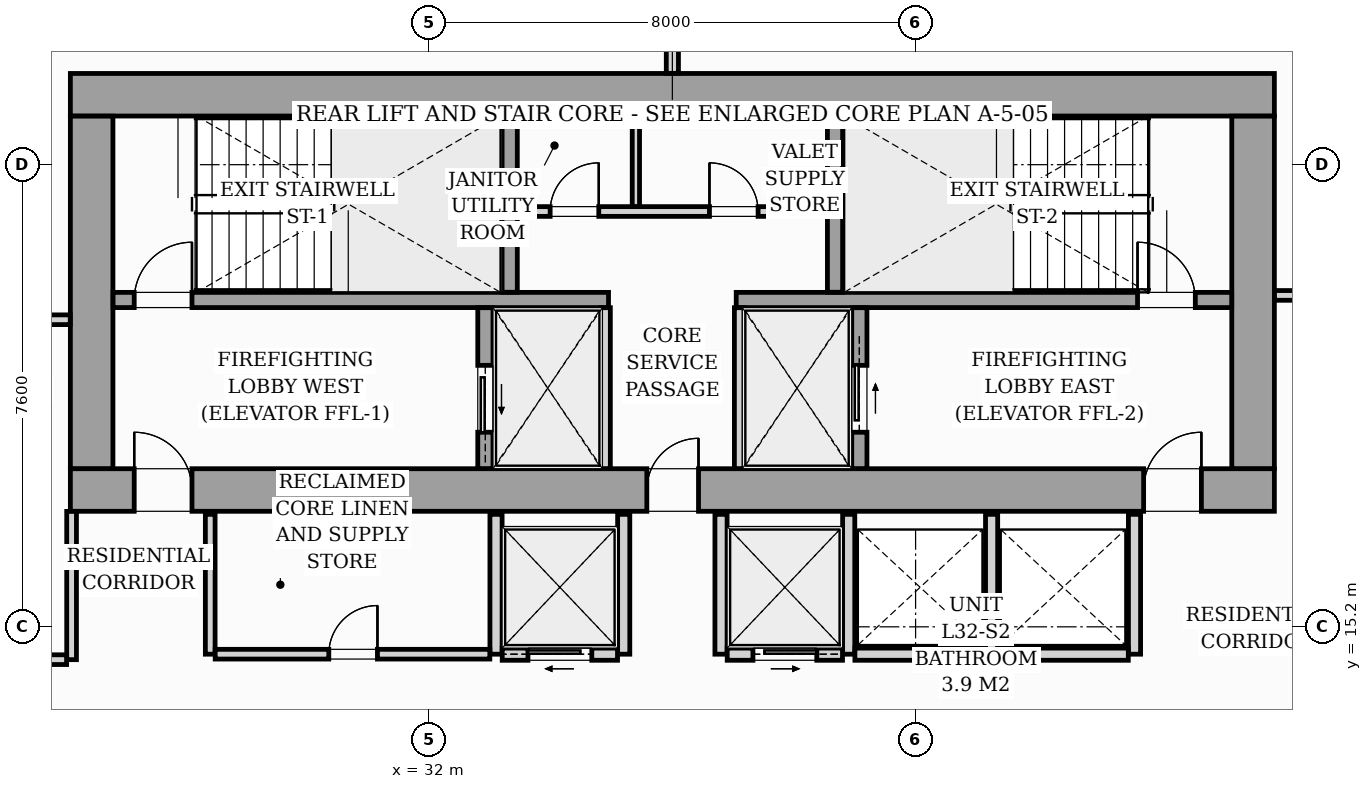
"""IFC4 building model, lengths in metres.
Left out: names, types, materials, properties, quantities, classifications, styles, units other than length and angle.
Written with IfcOpenShell. Run it as: python <this file> out.ifc"""

import sys

from ifc_helpers import new_model, si_unit, direction, frame, frame_2d, origin, origin_2d, place, context, subcontext, project, spatial, rectangle, i_section, extrude, source, transform, mapped, element, fill, save


model = new_model("IFC4")
c1 = context("Model", 3, precision=1e-05, world=origin(), true_north=direction((0.0, 1.0)))
c2 = subcontext(c1, "Body", "Model", "MODEL_VIEW")
j1 = project(units=[si_unit("LENGTHUNIT", "METRE"), si_unit("PLANEANGLEUNIT", "RADIAN")], contexts=[c1])
p1 = place(None, origin())
s1 = spatial("IfcSite", under=j1, at=p1, CompositionType="ELEMENT")
p2 = place(p1, origin())
s2 = spatial("IfcBuilding", under=s1, at=p2, CompositionType="ELEMENT")
p3 = place(p2, frame((0.0, 0.0, 113.0)))
s3 = spatial("IfcBuildingStorey", under=s2, at=p3, CompositionType="ELEMENT", Elevation=113.0)
m1 = source(origin(), c2, "Body", "SweptSolid", [
    extrude(i_section(OverallWidth=0.427, OverallDepth=0.483, WebThickness=0.051, FlangeThickness=0.082, FilletRadius=0.018, at=origin_2d()), origin(), (0.0, 0.0, 1.0), 3.196),
])
for number, where, z_axis, x_axis in (
    (1, (26.4, 17.4, 0.002), (0.0, 0.0, 1.0), (1.0, 0.0, 0.0)),
    (2, (33.12, 17.4, 0.002), (0.0, 0.0, 1.0), (1.0, 0.0, 0.0)),
    (3, (38.88, 17.4, 0.002), (0.0, 0.0, 1.0), (1.0, 0.0, 0.0)),
    (4, (45.6, 17.4, 0.002), (0.0, 0.0, 1.0), (1.0, 0.0, 0.0)),
    (5, (26.4, 24.0, 0.002), (0.0, 0.0, 1.0), (1.0, 0.0, 0.0)),
    (6, (33.12, 24.0, 0.002), (0.0, 0.0, 1.0), (1.0, 0.0, 0.0)),
    (7, (38.88, 24.0, 0.002), (0.0, 0.0, 1.0), (1.0, 0.0, 0.0)),
    (8, (45.6, 24.0, 0.002), (0.0, 0.0, 1.0), (1.0, 0.0, 0.0)),
):
    element("IfcColumn", number, at=place(p3, frame(where, z_axis=z_axis, x_axis=x_axis)), inside=s3, PredefinedType="PILASTER", context=c2, shape_type="MappedRepresentation", body=[
        mapped(m1, transform((0.0, 0.0, 0.0), scale=1.0)),
    ])
p4 = place(p3, frame((11.08, 23.508, 0.0), z_axis=(0.0, 0.0, 1.0), x_axis=(0.995396638587, 0.095841180552, 0.0)))
e9 = element("IfcWall", 9, at=p4, inside=s3, PredefinedType="STANDARD", context=c2, shape_type="SweptSolid", body=[
    extrude(rectangle(XDim=19.11, YDim=0.26, at=frame_2d((9.555, 0.0))), origin(), (0.0, 0.0, 1.0), 2.94),
])
p5 = place(p4, frame((10.823, 0.0, 0.0)))
e10 = element("IfcOpeningElement", 10, at=p5, cuts=e9, PredefinedType="OPENING", context=c2, shape_type="SweptSolid", body=[
    extrude(rectangle(XDim=1.8, YDim=2.06, at=frame_2d((0.9, 1.03))), frame((0.0, 0.14, 0.0), z_axis=(0.0, -1.0, 0.0), x_axis=(1.0, 0.0, 0.0)), (0.0, 0.0, 1.0), 0.28),
])
p6 = place(p4, frame((2.05, 0.0, 0.65)))
e11 = element("IfcOpeningElement", 11, at=p6, cuts=e9, PredefinedType="OPENING", context=c2, shape_type="SweptSolid", body=[
    extrude(rectangle(XDim=1.6, YDim=1.5, at=frame_2d((0.8, 0.75))), frame((0.0, 0.14, 0.0), z_axis=(0.0, -1.0, 0.0), x_axis=(1.0, 0.0, 0.0)), (0.0, 0.0, 1.0), 0.28),
])
p7 = place(p3, frame((26.1, 17.45, 0.0), z_axis=(0.0, 0.0, 1.0), x_axis=(1.0, 0.0, 0.0)))
e12 = element("IfcWall", 12, at=p7, inside=s3, PredefinedType="SHEAR", context=c2, shape_type="SweptSolid", body=[
    extrude(rectangle(XDim=19.8, YDim=0.7, at=frame_2d((9.9, 0.0))), origin(), (0.0, 0.0, 1.0), 3.2),
])
p8 = place(p7, frame((1.05, 0.0, 0.0)))
e13 = element("IfcOpeningElement", 13, at=p8, cuts=e12, PredefinedType="OPENING", context=c2, shape_type="SweptSolid", body=[
    extrude(rectangle(XDim=0.95, YDim=2.06, at=frame_2d((0.475, 1.03))), frame((0.0, 0.36, 0.0), z_axis=(0.0, -1.0, 0.0), x_axis=(1.0, 0.0, 0.0)), (0.0, 0.0, 1.0), 0.72),
])
p9 = place(p7, frame((9.48, 0.0, 0.0)))
e14 = element("IfcOpeningElement", 14, at=p9, cuts=e12, PredefinedType="OPENING", context=c2, shape_type="SweptSolid", body=[
    extrude(rectangle(XDim=0.85, YDim=2.0, at=frame_2d((0.425, 1.0))), frame((0.0, 0.36, 0.0), z_axis=(0.0, -1.0, 0.0), x_axis=(1.0, 0.0, 0.0)), (0.0, 0.0, 1.0), 0.72),
])
p10 = place(p7, frame((17.65, 0.0, 0.0)))
e15 = element("IfcOpeningElement", 15, at=p10, cuts=e12, PredefinedType="OPENING", context=c2, shape_type="SweptSolid", body=[
    extrude(rectangle(XDim=0.95, YDim=2.06, at=frame_2d((0.475, 1.03))), frame((0.0, 0.36, 0.0), z_axis=(0.0, -1.0, 0.0), x_axis=(1.0, 0.0, 0.0)), (0.0, 0.0, 1.0), 0.72),
])
p11 = place(p3, frame((26.1, 23.95, 0.0), z_axis=(0.0, 0.0, 1.0), x_axis=(1.0, 0.0, 0.0)))
e16 = element("IfcWall", 16, at=p11, inside=s3, PredefinedType="SHEAR", context=c2, shape_type="SweptSolid", body=[
    extrude(rectangle(XDim=19.8, YDim=0.7, at=frame_2d((9.9, 0.0))), origin(), (0.0, 0.0, 1.0), 3.2),
])
for number, where, z_axis, x_axis in (
    (17, (26.45, 17.802, 0.0), (0.0, 0.0, 1.0), (0.0, 1.0, 0.0)),
    (18, (45.55, 17.802, 0.0), (0.0, 0.0, 1.0), (0.0, 1.0, 0.0)),
):
    element("IfcWall", number, at=place(p3, frame(where, z_axis=z_axis, x_axis=x_axis)), inside=s3, PredefinedType="SHEAR", context=c2, shape_type="SweptSolid", body=[
        extrude(rectangle(XDim=5.796, YDim=0.7, at=frame_2d((2.898, 0.0))), origin(), (0.0, 0.0, 1.0), 3.2),
    ])
p12 = place(p3, frame((26.802, 20.575, 0.0), z_axis=(0.0, 0.0, 1.0), x_axis=(1.0, 0.0, 0.0)))
e19 = element("IfcWall", 19, at=p12, inside=s3, PredefinedType="SOLIDWALL", context=c2, shape_type="SweptSolid", body=[
    extrude(rectangle(XDim=8.148, YDim=0.25, at=frame_2d((4.074, 0.0))), origin(), (0.0, 0.0, 1.0), 3.2),
])
p13 = place(p12, frame((0.348, 0.0, 0.0)))
e20 = element("IfcOpeningElement", 20, at=p13, cuts=e19, PredefinedType="OPENING", context=c2, shape_type="SweptSolid", body=[
    extrude(rectangle(XDim=0.95, YDim=2.06, at=frame_2d((0.475, 1.03))), frame((0.0, 0.135, 0.0), z_axis=(0.0, -1.0, 0.0), x_axis=(1.0, 0.0, 0.0)), (0.0, 0.0, 1.0), 0.27),
])
p14 = place(p3, frame((37.05, 20.575, 0.0), z_axis=(0.0, 0.0, 1.0), x_axis=(1.0, 0.0, 0.0)))
e21 = element("IfcWall", 21, at=p14, inside=s3, PredefinedType="SOLIDWALL", context=c2, shape_type="SweptSolid", body=[
    extrude(rectangle(XDim=8.148, YDim=0.25, at=frame_2d((4.074, 0.0))), origin(), (0.0, 0.0, 1.0), 3.2),
])
p15 = place(p14, frame((6.6, 0.0, 0.0)))
e22 = element("IfcOpeningElement", 22, at=p15, cuts=e21, PredefinedType="OPENING", context=c2, shape_type="SweptSolid", body=[
    extrude(rectangle(XDim=0.95, YDim=2.06, at=frame_2d((0.475, 1.03))), frame((0.0, 0.135, 0.0), z_axis=(0.0, -1.0, 0.0), x_axis=(1.0, 0.0, 0.0)), (0.0, 0.0, 1.0), 0.27),
])
for number, where, z_axis, x_axis in (
    (23, (33.325, 20.702, 0.0), (0.0, 0.0, 1.0), (0.0, 1.0, 0.0)),
    (24, (38.675, 20.702, 0.0), (0.0, 0.0, 1.0), (0.0, 1.0, 0.0)),
):
    element("IfcWall", number, at=place(p3, frame(where, z_axis=z_axis, x_axis=x_axis)), inside=s3, PredefinedType="SOLIDWALL", context=c2, shape_type="SweptSolid", body=[
        extrude(rectangle(XDim=2.896, YDim=0.25, at=frame_2d((1.448, 0.0))), origin(), (0.0, 0.0, 1.0), 3.2),
    ])
p16 = place(p3, frame((32.925, 17.802, 0.0), z_axis=(0.0, 0.0, 1.0), x_axis=(0.0, 1.0, 0.0)))
e25 = element("IfcWall", 25, at=p16, inside=s3, PredefinedType="SOLIDWALL", context=c2, shape_type="SweptSolid", body=[
    extrude(rectangle(XDim=2.646, YDim=0.25, at=frame_2d((1.323, 0.0))), origin(), (0.0, 0.0, 1.0), 3.2),
])
p17 = place(p16, frame((0.598, 0.0, 0.0)))
e26 = element("IfcOpeningElement", 26, at=p17, cuts=e25, PredefinedType="OPENING", context=c2, shape_type="SweptSolid", body=[
    extrude(rectangle(XDim=1.1, YDim=2.08, at=frame_2d((0.55, 1.04))), frame((0.0, 0.135, 0.0), z_axis=(0.0, -1.0, 0.0), x_axis=(1.0, 0.0, 0.0)), (0.0, 0.0, 1.0), 0.27),
])
for number, where, z_axis, x_axis in (
    (27, (34.9, 17.802, 0.0), (0.0, 0.0, 1.0), (0.0, 1.0, 0.0)),
    (28, (37.1, 17.802, 0.0), (0.0, 0.0, 1.0), (0.0, 1.0, 0.0)),
):
    element("IfcWall", number, at=place(p3, frame(where, z_axis=z_axis, x_axis=x_axis)), inside=s3, PredefinedType="PARTITIONING", context=c2, shape_type="SweptSolid", body=[
        extrude(rectangle(XDim=2.646, YDim=0.16, at=frame_2d((1.323, 0.0))), origin(), (0.0, 0.0, 1.0), 2.94),
    ])
p18 = place(p3, frame((39.075, 17.802, 0.0), z_axis=(0.0, 0.0, 1.0), x_axis=(0.0, 1.0, 0.0)))
e29 = element("IfcWall", 29, at=p18, inside=s3, PredefinedType="SOLIDWALL", context=c2, shape_type="SweptSolid", body=[
    extrude(rectangle(XDim=2.646, YDim=0.25, at=frame_2d((1.323, 0.0))), origin(), (0.0, 0.0, 1.0), 3.2),
])
p19 = place(p18, frame((0.598, 0.0, 0.0)))
e30 = element("IfcOpeningElement", 30, at=p19, cuts=e29, PredefinedType="OPENING", context=c2, shape_type="SweptSolid", body=[
    extrude(rectangle(XDim=1.1, YDim=2.08, at=frame_2d((0.55, 1.04))), frame((0.0, 0.135, 0.0), z_axis=(0.0, -1.0, 0.0), x_axis=(1.0, 0.0, 0.0)), (0.0, 0.0, 1.0), 0.27),
])
p20 = place(p3, frame((33.452, 22.03, 0.0), z_axis=(0.0, 0.0, 1.0), x_axis=(1.0, 0.0, 0.0)))
e31 = element("IfcWall", 31, at=p20, inside=s3, PredefinedType="PARTITIONING", context=c2, shape_type="SweptSolid", body=[
    extrude(rectangle(XDim=5.096, YDim=0.16, at=frame_2d((2.548, 0.0))), origin(), (0.0, 0.0, 1.0), 2.94),
])
p21 = place(p20, frame((0.538, 0.0, 0.0)))
e32 = element("IfcOpeningElement", 32, at=p21, cuts=e31, PredefinedType="OPENING", context=c2, shape_type="SweptSolid", body=[
    extrude(rectangle(XDim=0.8, YDim=2.05, at=frame_2d((0.4, 1.025))), frame((0.0, 0.09, 0.0), z_axis=(0.0, -1.0, 0.0), x_axis=(1.0, 0.0, 0.0)), (0.0, 0.0, 1.0), 0.18),
])
p22 = place(p20, frame((3.158, 0.0, 0.0)))
e33 = element("IfcOpeningElement", 33, at=p22, cuts=e31, PredefinedType="OPENING", context=c2, shape_type="SweptSolid", body=[
    extrude(rectangle(XDim=0.8, YDim=2.05, at=frame_2d((0.4, 1.025))), frame((0.0, 0.09, 0.0), z_axis=(0.0, -1.0, 0.0), x_axis=(1.0, 0.0, 0.0)), (0.0, 0.0, 1.0), 0.18),
])
p23 = place(p3, frame((35.4, 22.112, 0.0), z_axis=(0.0, 0.0, 1.0), x_axis=(0.0, 1.0, 0.0)))
e34 = element("IfcWall", 34, at=p23, inside=s3, PredefinedType="PARTITIONING", context=c2, shape_type="SweptSolid", body=[
    extrude(rectangle(XDim=1.486, YDim=0.12, at=frame_2d((0.743, 0.0))), origin(), (0.0, 0.0, 1.0), 2.94),
])
p24 = place(p3, frame((28.4, 14.75, 0.0), z_axis=(0.0, 0.0, 1.0), x_axis=(0.0, 1.0, 0.0)))
e35 = element("IfcWall", 35, at=p24, inside=s3, PredefinedType="PARTITIONING", context=c2, shape_type="SweptSolid", body=[
    extrude(rectangle(XDim=2.3, YDim=0.16, at=frame_2d((1.15, 0.0))), origin(), (0.0, 0.0, 1.0), 2.94),
])
p25 = place(p3, frame((33.1, 14.75, 0.0), z_axis=(0.0, 0.0, 1.0), x_axis=(0.0, 1.0, 0.0)))
e36 = element("IfcWall", 36, at=p25, inside=s3, PredefinedType="PARTITIONING", context=c2, shape_type="SweptSolid", body=[
    extrude(rectangle(XDim=2.3, YDim=0.2, at=frame_2d((1.15, 0.0))), origin(), (0.0, 0.0, 1.0), 2.94),
])
p26 = place(p3, frame((28.482, 14.75, 0.0), z_axis=(0.0, 0.0, 1.0), x_axis=(1.0, 0.0, 0.0)))
e37 = element("IfcWall", 37, at=p26, inside=s3, PredefinedType="PARTITIONING", context=c2, shape_type="SweptSolid", body=[
    extrude(rectangle(XDim=4.516, YDim=0.16, at=frame_2d((2.258, 0.0))), origin(), (0.0, 0.0, 1.0), 2.94),
])
p27 = place(p26, frame((1.868, 0.0, 0.0)))
e38 = element("IfcOpeningElement", 38, at=p27, cuts=e37, PredefinedType="OPENING", context=c2, shape_type="SweptSolid", body=[
    extrude(rectangle(XDim=0.8, YDim=2.05, at=frame_2d((0.4, 1.025))), frame((0.0, 0.09, 0.0), z_axis=(0.0, -1.0, 0.0), x_axis=(1.0, 0.0, 0.0)), (0.0, 0.0, 1.0), 0.18),
])
p28 = place(p3, frame((35.2, 14.75, 0.0), z_axis=(0.0, 0.0, 1.0), x_axis=(0.0, 1.0, 0.0)))
e39 = element("IfcWall", 39, at=p28, inside=s3, PredefinedType="PARTITIONING", context=c2, shape_type="SweptSolid", body=[
    extrude(rectangle(XDim=2.3, YDim=0.2, at=frame_2d((1.15, 0.0))), origin(), (0.0, 0.0, 1.0), 2.94),
])
p29 = place(p3, frame((33.202, 14.75, 0.0), z_axis=(0.0, 0.0, 1.0), x_axis=(1.0, 0.0, 0.0)))
e40 = element("IfcWall", 40, at=p29, inside=s3, PredefinedType="PARTITIONING", context=c2, shape_type="SweptSolid", body=[
    extrude(rectangle(XDim=1.896, YDim=0.2, at=frame_2d((0.948, 0.0))), origin(), (0.0, 0.0, 1.0), 2.94),
])
p30 = place(p29, frame((0.423, 0.0, 0.0)))
e41 = element("IfcOpeningElement", 41, at=p30, cuts=e40, PredefinedType="OPENING", context=c2, shape_type="SweptSolid", body=[
    extrude(rectangle(XDim=1.05, YDim=2.08, at=frame_2d((0.525, 1.04))), frame((0.0, 0.11, 0.0), z_axis=(0.0, -1.0, 0.0), x_axis=(1.0, 0.0, 0.0)), (0.0, 0.0, 1.0), 0.22),
])
for number, where, z_axis, x_axis in (
    (42, (36.8, 14.75, 0.0), (0.0, 0.0, 1.0), (0.0, 1.0, 0.0)),
    (43, (38.9, 14.75, 0.0), (0.0, 0.0, 1.0), (0.0, 1.0, 0.0)),
):
    element("IfcWall", number, at=place(p3, frame(where, z_axis=z_axis, x_axis=x_axis)), inside=s3, PredefinedType="PARTITIONING", context=c2, shape_type="SweptSolid", body=[
        extrude(rectangle(XDim=2.3, YDim=0.2, at=frame_2d((1.15, 0.0))), origin(), (0.0, 0.0, 1.0), 2.94),
    ])
p31 = place(p3, frame((36.902, 14.75, 0.0), z_axis=(0.0, 0.0, 1.0), x_axis=(1.0, 0.0, 0.0)))
e44 = element("IfcWall", 44, at=p31, inside=s3, PredefinedType="PARTITIONING", context=c2, shape_type="SweptSolid", body=[
    extrude(rectangle(XDim=1.896, YDim=0.2, at=frame_2d((0.948, 0.0))), origin(), (0.0, 0.0, 1.0), 2.94),
])
p32 = place(p31, frame((0.423, 0.0, 0.0)))
e45 = element("IfcOpeningElement", 45, at=p32, cuts=e44, PredefinedType="OPENING", context=c2, shape_type="SweptSolid", body=[
    extrude(rectangle(XDim=1.05, YDim=2.08, at=frame_2d((0.525, 1.04))), frame((0.0, 0.11, 0.0), z_axis=(0.0, -1.0, 0.0), x_axis=(1.0, 0.0, 0.0)), (0.0, 0.0, 1.0), 0.22),
])
for number, where, z_axis, x_axis in (
    (46, (41.25, 14.75, 0.0), (0.0, 0.0, 1.0), (0.0, 1.0, 0.0)),
    (47, (43.6, 14.75, 0.0), (0.0, 0.0, 1.0), (0.0, 1.0, 0.0)),
):
    element("IfcWall", number, at=place(p3, frame(where, z_axis=z_axis, x_axis=x_axis)), inside=s3, PredefinedType="PARTITIONING", context=c2, shape_type="SweptSolid", body=[
        extrude(rectangle(XDim=2.3, YDim=0.2, at=frame_2d((1.15, 0.0))), origin(), (0.0, 0.0, 1.0), 2.94),
    ])
for number, where, z_axis, x_axis in (
    (48, (39.002, 14.75, 0.0), (0.0, 0.0, 1.0), (1.0, 0.0, 0.0)),
    (49, (41.352, 14.75, 0.0), (0.0, 0.0, 1.0), (1.0, 0.0, 0.0)),
):
    element("IfcWall", number, at=place(p3, frame(where, z_axis=z_axis, x_axis=x_axis)), inside=s3, PredefinedType="PARTITIONING", context=c2, shape_type="SweptSolid", body=[
        extrude(rectangle(XDim=2.146, YDim=0.2, at=frame_2d((1.073, 0.0))), origin(), (0.0, 0.0, 1.0), 2.94),
    ])
p33 = place(p3, frame((36.0, 24.302, 0.0), z_axis=(0.0, 0.0, 1.0), x_axis=(0.0, 1.0, 0.0)))
e50 = element("IfcWall", 50, at=p33, inside=s3, PredefinedType="PARTITIONING", context=c2, shape_type="SweptSolid", body=[
    extrude(rectangle(XDim=1.656, YDim=0.2, at=frame_2d((0.828, 0.0))), origin(), (0.0, 0.0, 1.0), 2.94),
])
p34 = place(p3, frame((45.902, 20.65, 0.0), z_axis=(0.0, 0.0, 1.0), x_axis=(1.0, 0.0, 0.0)))
e51 = element("IfcWall", 51, at=p34, inside=s3, PredefinedType="PARTITIONING", context=c2, shape_type="SweptSolid", body=[
    extrude(rectangle(XDim=1.716, YDim=0.16, at=frame_2d((0.858, 0.0))), origin(), (0.0, 0.0, 1.0), 2.94),
])
p35 = place(p3, frame((23.632, 20.25, 0.0), z_axis=(0.0, 0.0, 1.0), x_axis=(1.0, 0.0, 0.0)))
e52 = element("IfcWall", 52, at=p35, inside=s3, PredefinedType="PARTITIONING", context=c2, shape_type="SweptSolid", body=[
    extrude(rectangle(XDim=2.466, YDim=0.16, at=frame_2d((1.233, 0.0))), origin(), (0.0, 0.0, 1.0), 2.94),
])
p36 = place(p3, frame((26.12, 14.66, 0.0), z_axis=(0.0, 0.0, 1.0), x_axis=(0.0, 1.0, 0.0)))
e53 = element("IfcWall", 53, at=p36, inside=s3, PredefinedType="PARTITIONING", context=c2, shape_type="SweptSolid", body=[
    extrude(rectangle(XDim=2.438, YDim=0.16, at=frame_2d((1.219, 0.0))), origin(), (0.0, 0.0, 1.0), 2.94),
])
p37 = place(p3, frame((23.632, 14.66, 0.0), z_axis=(0.0, 0.0, 1.0), x_axis=(1.0, 0.0, 0.0)))
e54 = element("IfcWall", 54, at=p37, inside=s3, PredefinedType="PARTITIONING", context=c2, shape_type="SweptSolid", body=[
    extrude(rectangle(XDim=2.406, YDim=0.16, at=frame_2d((1.203, 0.0))), origin(), (0.0, 0.0, 1.0), 2.94),
])
m2 = source(origin(), c2, "Body", "SweptSolid", [
    extrude(rectangle(XDim=0.95, YDim=2.06, at=frame_2d((0.475, 1.03))), frame((0.0, 0.025, 0.0), z_axis=(0.0, -1.0, 0.0), x_axis=(1.0, 0.0, 0.0)), (0.0, 0.0, 1.0), 0.05),
])
p38 = place(p8, origin())
e55 = element("IfcDoor", 55, at=p38, inside=s3, OperationType="SINGLE_SWING_LEFT", PredefinedType="DOOR", context=c2, shape_type="MappedRepresentation", body=[
    mapped(m2, transform((0.0, 0.0, 0.0), scale=1.0)),
])
fill(e13, e55)
m3 = source(origin(), c2, "Body", "SweptSolid", [
    extrude(rectangle(XDim=0.85, YDim=2.0, at=frame_2d((0.425, 1.0))), frame((0.0, 0.025, 0.0), z_axis=(0.0, -1.0, 0.0), x_axis=(1.0, 0.0, 0.0)), (0.0, 0.0, 1.0), 0.05),
])
p39 = place(p9, origin())
e56 = element("IfcDoor", 56, at=p39, inside=s3, OperationType="SINGLE_SWING_RIGHT", PredefinedType="DOOR", context=c2, shape_type="MappedRepresentation", body=[
    mapped(m3, transform((0.0, 0.0, 0.0), scale=1.0)),
])
fill(e14, e56)
p40 = place(p10, origin())
e57 = element("IfcDoor", 57, at=p40, inside=s3, OperationType="SINGLE_SWING_RIGHT", PredefinedType="DOOR", context=c2, shape_type="MappedRepresentation", body=[
    mapped(m2, transform((0.0, 0.0, 0.0), scale=1.0)),
])
fill(e15, e57)
p41 = place(p13, origin())
e58 = element("IfcDoor", 58, at=p41, inside=s3, OperationType="SINGLE_SWING_RIGHT", PredefinedType="DOOR", context=c2, shape_type="MappedRepresentation", body=[
    mapped(m2, transform((0.0, 0.0, 0.0), scale=1.0)),
])
fill(e20, e58)
p42 = place(p15, origin())
e59 = element("IfcDoor", 59, at=p42, inside=s3, OperationType="SINGLE_SWING_LEFT", PredefinedType="DOOR", context=c2, shape_type="MappedRepresentation", body=[
    mapped(m2, transform((0.0, 0.0, 0.0), scale=1.0)),
])
fill(e22, e59)
m4 = source(origin(), c2, "Body", "SweptSolid", [
    extrude(rectangle(XDim=1.1, YDim=2.08, at=frame_2d((0.55, 1.04))), frame((0.0, 0.025, 0.0), z_axis=(0.0, -1.0, 0.0), x_axis=(1.0, 0.0, 0.0)), (0.0, 0.0, 1.0), 0.05),
])
p43 = place(p17, origin())
e60 = element("IfcDoor", 60, at=p43, inside=s3, OperationType="SLIDING_TO_LEFT", PredefinedType="DOOR", context=c2, shape_type="MappedRepresentation", body=[
    mapped(m4, transform((0.0, 0.0, 0.0), scale=1.0)),
])
fill(e26, e60)
p44 = place(p19, origin())
e61 = element("IfcDoor", 61, at=p44, inside=s3, OperationType="SLIDING_TO_RIGHT", PredefinedType="DOOR", context=c2, shape_type="MappedRepresentation", body=[
    mapped(m4, transform((0.0, 0.0, 0.0), scale=1.0)),
])
fill(e30, e61)
m5 = source(origin(), c2, "Body", "SweptSolid", [
    extrude(rectangle(XDim=0.8, YDim=2.05, at=frame_2d((0.4, 1.025))), frame((0.0, 0.025, 0.0), z_axis=(0.0, -1.0, 0.0), x_axis=(1.0, 0.0, 0.0)), (0.0, 0.0, 1.0), 0.05),
])
p45 = place(p21, origin())
e62 = element("IfcDoor", 62, at=p45, inside=s3, OperationType="SINGLE_SWING_RIGHT", PredefinedType="DOOR", context=c2, shape_type="MappedRepresentation", body=[
    mapped(m5, transform((0.0, 0.0, 0.0), scale=1.0)),
])
fill(e32, e62)
p46 = place(p22, origin())
e63 = element("IfcDoor", 63, at=p46, inside=s3, OperationType="SINGLE_SWING_LEFT", PredefinedType="DOOR", context=c2, shape_type="MappedRepresentation", body=[
    mapped(m5, transform((0.0, 0.0, 0.0), scale=1.0)),
])
fill(e33, e63)
p47 = place(p27, origin())
e64 = element("IfcDoor", 64, at=p47, inside=s3, OperationType="SINGLE_SWING_RIGHT", PredefinedType="DOOR", context=c2, shape_type="MappedRepresentation", body=[
    mapped(m5, transform((0.0, 0.0, 0.0), scale=1.0)),
])
fill(e38, e64)
m6 = source(origin(), c2, "Body", "SweptSolid", [
    extrude(rectangle(XDim=1.05, YDim=2.08, at=frame_2d((0.525, 1.04))), frame((0.0, 0.025, 0.0), z_axis=(0.0, -1.0, 0.0), x_axis=(1.0, 0.0, 0.0)), (0.0, 0.0, 1.0), 0.05),
])
p48 = place(p30, origin())
e65 = element("IfcDoor", 65, at=p48, inside=s3, OperationType="SLIDING_TO_LEFT", PredefinedType="DOOR", context=c2, shape_type="MappedRepresentation", body=[
    mapped(m6, transform((0.0, 0.0, 0.0), scale=1.0)),
])
fill(e41, e65)
p49 = place(p32, origin())
e66 = element("IfcDoor", 66, at=p49, inside=s3, OperationType="SLIDING_TO_RIGHT", PredefinedType="DOOR", context=c2, shape_type="MappedRepresentation", body=[
    mapped(m6, transform((0.0, 0.0, 0.0), scale=1.0)),
])
fill(e45, e66)
save(model, sys.argv[1])
